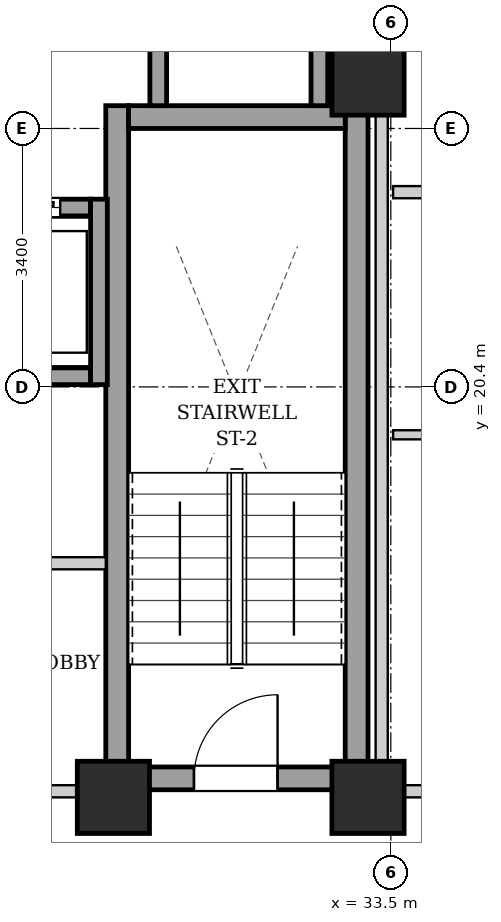
"""IFC4 building model, lengths in metres.
Left out: names, types, materials, properties, quantities, classifications, styles, units other than length and angle.
Written with IfcOpenShell. Run it as: python <this file> out.ifc"""

import sys

from ifc_helpers import new_model, si_unit, direction, frame, frame_2d, origin, origin_2d, place, context, subcontext, project, spatial, rectangle, extrude, element, fill, save


model = new_model("IFC4")
c1 = context("Model", 3, precision=1e-05, world=origin(), true_north=direction((0.0, 1.0)))
c2 = subcontext(c1, "Body", "Model", "MODEL_VIEW")
j1 = project(units=[si_unit("LENGTHUNIT", "METRE"), si_unit("PLANEANGLEUNIT", "RADIAN")], contexts=[c1])
p1 = place(None, origin())
s1 = spatial("IfcSite", under=j1, at=p1, CompositionType="ELEMENT")
p2 = place(p1, origin())
s2 = spatial("IfcBuilding", under=s1, at=p2, CompositionType="ELEMENT")
p3 = place(p2, frame((0.0, 0.0, 134.15)))
s3 = spatial("IfcBuildingStorey", under=s2, at=p3, CompositionType="ELEMENT", Elevation=134.15)
for number, where, z_axis, x_axis in (
    (1, (29.85, 15.0, 0.0), (0.0, 0.0, 1.0), (1.0, 0.0, 0.0)),
    (2, (33.2, 15.0, 0.0), (0.0, 0.0, 1.0), (1.0, 0.0, 0.0)),
    (3, (33.2, 24.45, 0.0), (0.0, 0.0, 1.0), (1.0, 0.0, 0.0)),
):
    element("IfcColumn", number, at=place(p3, frame(where, z_axis=z_axis, x_axis=x_axis)), inside=s3, PredefinedType="COLUMN", context=c2, shape_type="SweptSolid", body=[
        extrude(rectangle(XDim=0.95, YDim=0.95, at=origin_2d()), origin(), (0.0, 0.0, 1.0), 3.25),
    ])
for number, where, z_axis, x_axis in (
    (4, (29.9, 15.1, 0.0), (0.0, 0.0, 1.0), (0.0, 1.0, 0.0)),
    (5, (33.05, 15.1, 0.0), (0.0, 0.0, 1.0), (0.0, 1.0, 0.0)),
):
    element("IfcWall", number, at=place(p3, frame(where, z_axis=z_axis, x_axis=x_axis)), inside=s3, PredefinedType="SHEAR", context=c2, shape_type="SweptSolid", body=[
        extrude(rectangle(XDim=9.0, YDim=0.3, at=frame_2d((4.5, 0.0))), origin(), (0.0, 0.0, 1.0), 2.99),
    ])
p4 = place(p3, frame((30.05, 23.95, 0.0), z_axis=(0.0, 0.0, 1.0), x_axis=(1.0, 0.0, 0.0)))
e6 = element("IfcWall", 6, at=p4, inside=s3, PredefinedType="SHEAR", context=c2, shape_type="SweptSolid", body=[
    extrude(rectangle(XDim=2.85, YDim=0.3, at=frame_2d((1.425, 0.0))), origin(), (0.0, 0.0, 1.0), 2.99),
])
p5 = place(p3, frame((30.05, 15.25, 0.0), z_axis=(0.0, 0.0, 1.0), x_axis=(1.0, 0.0, 0.0)))
e7 = element("IfcWall", 7, at=p5, inside=s3, PredefinedType="SHEAR", context=c2, shape_type="SweptSolid", body=[
    extrude(rectangle(XDim=2.85, YDim=0.3, at=frame_2d((1.425, 0.0))), origin(), (0.0, 0.0, 1.0), 2.99),
])
p6 = place(p5, frame((0.86, 0.0, 0.0)))
e8 = element("IfcOpeningElement", 8, at=p6, cuts=e7, PredefinedType="OPENING", context=c2, shape_type="SweptSolid", body=[
    extrude(rectangle(XDim=1.1, YDim=2.05, at=frame_2d((0.55, 1.025))), frame((0.0, 0.16, 0.0), z_axis=(0.0, -1.0, 0.0), x_axis=(1.0, 0.0, 0.0)), (0.0, 0.0, 1.0), 0.32),
])
p7 = place(p3, frame((27.65, 20.54, 0.0), z_axis=(0.0, 0.0, 1.0), x_axis=(1.0, 0.0, 0.0)))
e9 = element("IfcWall", 9, at=p7, inside=s3, PredefinedType="SHEAR", context=c2, shape_type="SweptSolid", body=[
    extrude(rectangle(XDim=1.9, YDim=0.22, at=frame_2d((0.95, 0.0))), origin(), (0.0, 0.0, 1.0), 2.99),
])
p8 = place(p3, frame((27.65, 22.76, 0.0), z_axis=(0.0, 0.0, 1.0), x_axis=(1.0, 0.0, 0.0)))
e10 = element("IfcWall", 10, at=p8, inside=s3, PredefinedType="SHEAR", context=c2, shape_type="SweptSolid", body=[
    extrude(rectangle(XDim=1.9, YDim=0.22, at=frame_2d((0.95, 0.0))), origin(), (0.0, 0.0, 1.0), 2.99),
])
p9 = place(p8, frame((0.4, 0.0, 0.0)))
e11 = element("IfcOpeningElement", 11, at=p9, cuts=e10, PredefinedType="OPENING", context=c2, shape_type="SweptSolid", body=[
    extrude(rectangle(XDim=1.1, YDim=2.15, at=frame_2d((0.55, 1.075))), frame((0.0, 0.12, 0.0), z_axis=(0.0, -1.0, 0.0), x_axis=(1.0, 0.0, 0.0)), (0.0, 0.0, 1.0), 0.24),
])
p10 = place(p3, frame((29.66, 20.43, 0.0), z_axis=(0.0, 0.0, 1.0), x_axis=(0.0, 1.0, 0.0)))
e12 = element("IfcWall", 12, at=p10, inside=s3, PredefinedType="SHEAR", context=c2, shape_type="SweptSolid", body=[
    extrude(rectangle(XDim=2.44, YDim=0.22, at=frame_2d((1.22, 0.0))), origin(), (0.0, 0.0, 1.0), 2.99),
])
for number, where, z_axis, x_axis in (
    (13, (30.44, 24.1, 0.0), (0.0, 0.0, 1.0), (0.0, 1.0, 0.0)),
    (14, (32.56, 24.1, 0.0), (0.0, 0.0, 1.0), (0.0, 1.0, 0.0)),
):
    element("IfcWall", number, at=place(p3, frame(where, z_axis=z_axis, x_axis=x_axis)), inside=s3, PredefinedType="SHEAR", context=c2, shape_type="SweptSolid", body=[
        extrude(rectangle(XDim=2.07, YDim=0.22, at=frame_2d((1.035, 0.0))), origin(), (0.0, 0.0, 1.0), 2.99),
    ])
p11 = place(p3, frame((21.25, 15.08, 0.0), z_axis=(0.0, 0.0, 1.0), x_axis=(1.0, 0.0, 0.0)))
e15 = element("IfcWall", 15, at=p11, inside=s3, PredefinedType="PARTITIONING", context=c2, shape_type="SweptSolid", body=[
    extrude(rectangle(XDim=8.5, YDim=0.16, at=frame_2d((4.25, 0.0))), origin(), (0.0, 0.0, 1.0), 2.426),
])
p12 = place(p11, frame((3.725, 0.0, 0.0)))
e16 = element("IfcOpeningElement", 16, at=p12, cuts=e15, PredefinedType="OPENING", context=c2, shape_type="SweptSolid", body=[
    extrude(rectangle(XDim=1.05, YDim=2.05, at=frame_2d((0.525, 1.025))), frame((0.0, 0.09, 0.0), z_axis=(0.0, -1.0, 0.0), x_axis=(1.0, 0.0, 0.0)), (0.0, 0.0, 1.0), 0.18),
])
p13 = place(p3, frame((28.65, 18.08, 0.0), z_axis=(0.0, 0.0, 1.0), x_axis=(1.0, 0.0, 0.0)))
e17 = element("IfcWall", 17, at=p13, inside=s3, PredefinedType="PARTITIONING", context=c2, shape_type="SweptSolid", body=[
    extrude(rectangle(XDim=1.1, YDim=0.16, at=frame_2d((0.55, 0.0))), origin(), (0.0, 0.0, 1.0), 2.99),
])
p14 = place(p3, frame((33.12, 24.12, 0.0), z_axis=(0.0, 0.0, 1.0), x_axis=(0.0, 1.0, 0.0)))
e18 = element("IfcWall", 18, at=p14, inside=s3, PredefinedType="PARTITIONING", context=c2, shape_type="SweptSolid", body=[
    extrude(rectangle(XDim=4.76, YDim=0.16, at=frame_2d((2.38, 0.0))), origin(), (0.0, 0.0, 1.0), 2.99),
])
p15 = place(p3, frame((33.38, 15.08, 0.0), z_axis=(0.0, 0.0, 1.0), x_axis=(1.0, 0.0, 0.0)))
e19 = element("IfcWall", 19, at=p15, inside=s3, PredefinedType="PARTITIONING", context=c2, shape_type="SweptSolid", body=[
    extrude(rectangle(XDim=6.64, YDim=0.16, at=frame_2d((3.32, 0.0))), origin(), (0.0, 0.0, 1.0), 2.426),
])
p16 = place(p15, frame((0.9, 0.0, 0.0)))
e20 = element("IfcOpeningElement", 20, at=p16, cuts=e19, PredefinedType="OPENING", context=c2, shape_type="SweptSolid", body=[
    extrude(rectangle(XDim=0.95, YDim=2.1, at=frame_2d((0.475, 1.05))), frame((0.0, 0.09, 0.0), z_axis=(0.0, -1.0, 0.0), x_axis=(1.0, 0.0, 0.0)), (0.0, 0.0, 1.0), 0.18),
])
p17 = place(p3, frame((33.53, 22.962, 0.0), z_axis=(0.0, 0.0, 1.0), x_axis=(1.0, 0.0, 0.0)))
e21 = element("IfcWall", 21, at=p17, inside=s3, PredefinedType="PARTITIONING", context=c2, shape_type="SweptSolid", body=[
    extrude(rectangle(XDim=6.49, YDim=0.16, at=frame_2d((3.245, 0.0))), origin(), (0.0, 0.0, 1.0), 2.99),
])
p18 = place(p3, frame((33.53, 19.77, 0.0), z_axis=(0.0, 0.0, 1.0), x_axis=(1.0, 0.0, 0.0)))
e22 = element("IfcWall", 22, at=p18, inside=s3, PredefinedType="PARTITIONING", context=c2, shape_type="SweptSolid", body=[
    extrude(rectangle(XDim=2.45, YDim=0.12, at=frame_2d((1.225, 0.0))), origin(), (0.0, 0.0, 1.0), 2.99),
])
p19 = place(p18, frame((0.795, 0.0, 0.0)))
e23 = element("IfcOpeningElement", 23, at=p19, cuts=e22, PredefinedType="OPENING", context=c2, shape_type="SweptSolid", body=[
    extrude(rectangle(XDim=0.86, YDim=2.05, at=frame_2d((0.43, 1.025))), frame((0.0, 0.07, 0.0), z_axis=(0.0, -1.0, 0.0), x_axis=(1.0, 0.0, 0.0)), (0.0, 0.0, 1.0), 0.14),
])
p20 = place(p3, frame((33.38, 15.02, 0.0), z_axis=(0.0, 0.0, 1.0), x_axis=(0.0, 1.0, 0.0)))
e24 = element("IfcWall", 24, at=p20, inside=s3, PredefinedType="PARTITIONING", context=c2, shape_type="SweptSolid", body=[
    extrude(rectangle(XDim=13.98, YDim=0.16, at=frame_2d((6.99, 0.0))), origin(), (0.0, 0.0, 1.0), 2.99),
])
p21 = place(p6, origin())
e25 = element("IfcDoor", 25, at=p21, inside=s3, OperationType="SINGLE_SWING_RIGHT", PredefinedType="DOOR", context=c2, shape_type="SweptSolid", body=[
    extrude(rectangle(XDim=1.1, YDim=2.05, at=frame_2d((0.55, 1.025))), frame((0.0, 0.025, 0.0), z_axis=(0.0, -1.0, 0.0), x_axis=(1.0, 0.0, 0.0)), (0.0, 0.0, 1.0), 0.05),
])
fill(e8, e25)
p22 = place(p9, origin())
e26 = element("IfcDoor", 26, at=p22, inside=s3, OperationType="SLIDING_TO_LEFT", PredefinedType="DOOR", context=c2, shape_type="SweptSolid", body=[
    extrude(rectangle(XDim=1.1, YDim=2.15, at=frame_2d((0.55, 1.075))), frame((0.0, 0.025, 0.0), z_axis=(0.0, -1.0, 0.0), x_axis=(1.0, 0.0, 0.0)), (0.0, 0.0, 1.0), 0.05),
])
fill(e11, e26)
save(model, sys.argv[1])
